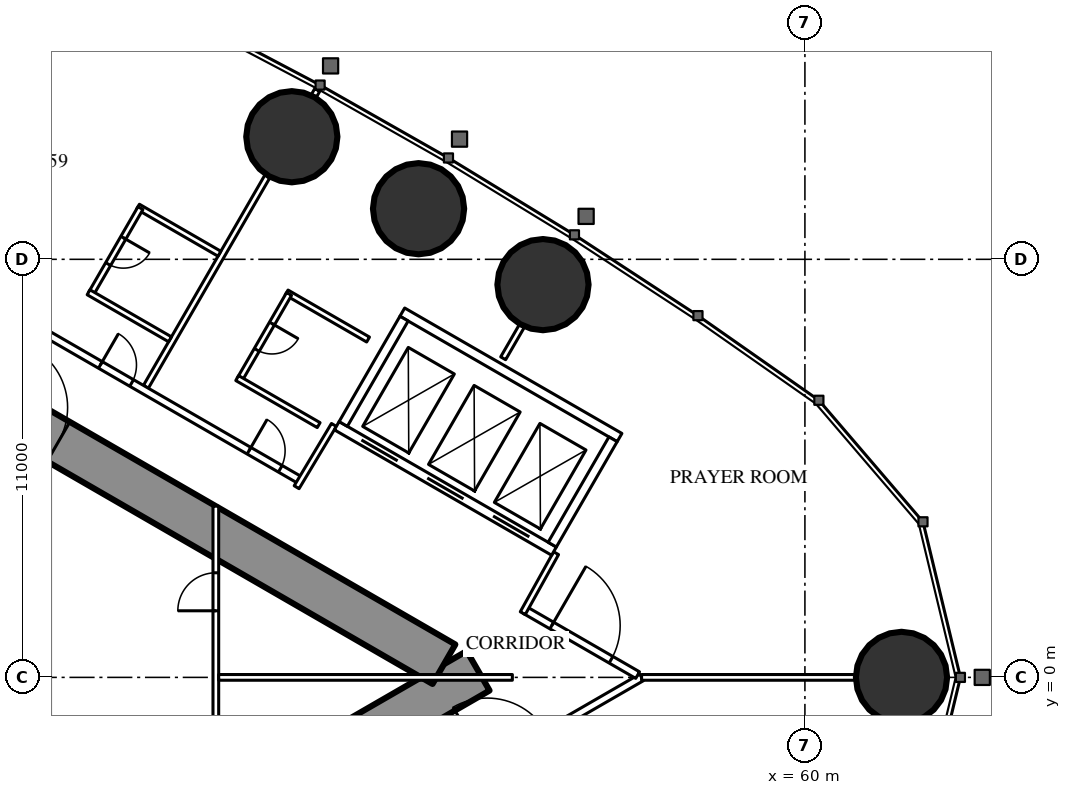
"""IFC4 building model, lengths in metres.
Left out: names, types, materials, properties, quantities, classifications, styles, units other than length and angle.
Written with IfcOpenShell. Run it as: python <this file> out.ifc"""

import sys

from ifc_helpers import new_model, si_unit, direction, frame, frame_2d, origin, origin_2d, place, context, subcontext, project, spatial, rectangle, circle, extrude, element, fill, save


model = new_model("IFC4")
c1 = context("Model", 3, precision=1e-05, world=origin(), true_north=direction((0.0, 1.0)))
c2 = subcontext(c1, "Body", "Model", "MODEL_VIEW")
j1 = project(units=[si_unit("LENGTHUNIT", "METRE"), si_unit("PLANEANGLEUNIT", "RADIAN")], contexts=[c1])
p1 = place(None, origin())
s1 = spatial("IfcSite", under=j1, at=p1, CompositionType="ELEMENT")
p2 = place(p1, origin())
s2 = spatial("IfcBuilding", under=s1, at=p2, CompositionType="ELEMENT")
p3 = place(p2, frame((0.0, 0.0, 244.1)))
s3 = spatial("IfcBuildingStorey", under=s2, at=p3, CompositionType="ELEMENT", Elevation=244.1)
for number, where, z_axis, x_axis in (
    (1, (62.542, 0.0, 0.0), (0.0, 0.0, 1.0), (1.0, 0.0, 0.0)),
    (2, (53.108, 10.334, 0.0), (0.0, 0.0, 1.0), (1.0, 0.0, 0.0)),
    (3, (49.834, 12.332, 0.0), (0.0, 0.0, 1.0), (1.0, 0.0, 0.0)),
    (4, (46.499, 14.226, 0.0), (0.0, 0.0, 1.0), (1.0, 0.0, 0.0)),
):
    element("IfcColumn", number, at=place(p3, frame(where, z_axis=z_axis, x_axis=x_axis)), inside=s3, PredefinedType="COLUMN", context=c2, shape_type="SweptSolid", body=[
        extrude(circle(Radius=1.2, at=origin_2d()), origin(), (0.0, 0.0, 1.0), 3.6),
    ])
p4 = place(p3, frame((27.2, -13.8, 0.0), z_axis=(0.0, 0.0, 1.0), x_axis=(0.866027159892, 0.499996958321, 0.0)))
e5 = element("IfcWall", 5, at=p4, inside=s3, PredefinedType="SHEAR", context=c2, shape_type="SweptSolid", body=[
    extrude(rectangle(XDim=27.947, YDim=1.2, at=frame_2d((13.973, 0.0))), origin(), (0.0, 0.0, 1.0), 3.6),
])
p5 = place(p4, frame((4.6, 0.0, 0.0)))
e6 = element("IfcOpeningElement", 6, at=p5, cuts=e5, PredefinedType="OPENING", context=c2, shape_type="SweptSolid", body=[
    extrude(rectangle(XDim=1.0, YDim=2.2, at=frame_2d((0.5, 1.1))), frame((0.0, 0.61, 0.0), z_axis=(0.0, -1.0, 0.0), x_axis=(1.0, 0.0, 0.0)), (0.0, 0.0, 1.0), 1.22),
])
p6 = place(p4, frame((13.395, 0.0, 0.0)))
e7 = element("IfcOpeningElement", 7, at=p6, cuts=e5, PredefinedType="OPENING", context=c2, shape_type="SweptSolid", body=[
    extrude(rectangle(XDim=1.8, YDim=2.2, at=frame_2d((0.9, 1.1))), frame((0.0, 0.61, 0.0), z_axis=(0.0, -1.0, 0.0), x_axis=(1.0, 0.0, 0.0)), (0.0, 0.0, 1.0), 1.22),
])
p7 = place(p3, frame((27.2, 13.8, 0.0), z_axis=(0.0, 0.0, 1.0), x_axis=(0.866024515034, -0.500001539357, 0.0)))
e8 = element("IfcWall", 8, at=p7, inside=s3, PredefinedType="SHEAR", context=c2, shape_type="SweptSolid", body=[
    extrude(rectangle(XDim=26.907, YDim=1.2, at=frame_2d((13.454, 0.0))), origin(), (0.0, 0.0, 1.0), 3.6),
])
p8 = place(p7, frame((4.6, 0.0, 0.0)))
e9 = element("IfcOpeningElement", 9, at=p8, cuts=e8, PredefinedType="OPENING", context=c2, shape_type="SweptSolid", body=[
    extrude(rectangle(XDim=1.0, YDim=2.2, at=frame_2d((0.5, 1.1))), frame((0.0, 0.61, 0.0), z_axis=(0.0, -1.0, 0.0), x_axis=(1.0, 0.0, 0.0)), (0.0, 0.0, 1.0), 1.22),
])
p9 = place(p7, frame((13.395, 0.0, 0.0)))
e10 = element("IfcOpeningElement", 10, at=p9, cuts=e8, PredefinedType="OPENING", context=c2, shape_type="SweptSolid", body=[
    extrude(rectangle(XDim=1.8, YDim=2.2, at=frame_2d((0.9, 1.1))), frame((0.0, 0.61, 0.0), z_axis=(0.0, -1.0, 0.0), x_axis=(1.0, 0.0, 0.0)), (0.0, 0.0, 1.0), 1.22),
])
p10 = place(p3, frame((28.959, -15.44, 0.0), z_axis=(0.0, 0.0, 1.0), x_axis=(0.866025227435, 0.500000305447, 0.0)))
e11 = element("IfcWall", 11, at=p10, inside=s3, PredefinedType="PARTITIONING", context=c2, shape_type="SweptSolid", body=[
    extrude(rectangle(XDim=30.88, YDim=0.2, at=frame_2d((15.44, 0.0))), origin(), (0.0, 0.0, 1.0), 3.35),
])
p11 = place(p10, frame((1.494, 0.0, 0.0)))
e12 = element("IfcOpeningElement", 12, at=p11, cuts=e11, PredefinedType="OPENING", context=c2, shape_type="SweptSolid", body=[
    extrude(rectangle(XDim=1.8, YDim=2.04, at=frame_2d((0.9, 1.02))), frame((0.0, 0.11, 0.0), z_axis=(0.0, -1.0, 0.0), x_axis=(1.0, 0.0, 0.0)), (0.0, 0.0, 1.0), 0.22),
])
p12 = place(p10, frame((7.687, 0.0, 0.0)))
e13 = element("IfcOpeningElement", 13, at=p12, cuts=e11, PredefinedType="OPENING", context=c2, shape_type="SweptSolid", body=[
    extrude(rectangle(XDim=1.0, YDim=2.2, at=frame_2d((0.5, 1.1))), frame((0.0, 0.11, 0.0), z_axis=(0.0, -1.0, 0.0), x_axis=(1.0, 0.0, 0.0)), (0.0, 0.0, 1.0), 0.22),
])
p13 = place(p10, frame((18.321, 0.0, 0.0)))
e14 = element("IfcOpeningElement", 14, at=p13, cuts=e11, PredefinedType="OPENING", context=c2, shape_type="SweptSolid", body=[
    extrude(rectangle(XDim=0.95, YDim=2.2, at=frame_2d((0.475, 1.1))), frame((0.0, 0.11, 0.0), z_axis=(0.0, -1.0, 0.0), x_axis=(1.0, 0.0, 0.0)), (0.0, 0.0, 1.0), 0.22),
])
p14 = place(p10, frame((22.203, 0.0, 0.0)))
e15 = element("IfcOpeningElement", 15, at=p14, cuts=e11, PredefinedType="OPENING", context=c2, shape_type="SweptSolid", body=[
    extrude(rectangle(XDim=0.95, YDim=2.2, at=frame_2d((0.475, 1.1))), frame((0.0, 0.11, 0.0), z_axis=(0.0, -1.0, 0.0), x_axis=(1.0, 0.0, 0.0)), (0.0, 0.0, 1.0), 0.22),
])
p15 = place(p10, frame((26.192, 0.0, 0.0)))
e16 = element("IfcOpeningElement", 16, at=p15, cuts=e11, PredefinedType="OPENING", context=c2, shape_type="SweptSolid", body=[
    extrude(rectangle(XDim=1.8, YDim=2.2, at=frame_2d((0.9, 1.1))), frame((0.0, 0.11, 0.0), z_axis=(0.0, -1.0, 0.0), x_axis=(1.0, 0.0, 0.0)), (0.0, 0.0, 1.0), 0.22),
])
p16 = place(p3, frame((42.66, 7.646, 0.0), z_axis=(0.0, 0.0, 1.0), x_axis=(0.499996592859, 0.866027370889, 0.0)))
e17 = element("IfcWall", 17, at=p16, inside=s3, PredefinedType="PARTITIONING", context=c2, shape_type="SweptSolid", body=[
    extrude(rectangle(XDim=6.398, YDim=0.15, at=frame_2d((3.199, 0.0))), origin(), (0.0, 0.0, 1.0), 2.45),
])
p17 = place(p3, frame((47.079, 15.3, 0.0), z_axis=(0.0, 0.0, 1.0), x_axis=(0.499212083968, 0.866479829667, 0.0)))
e18 = element("IfcWall", 18, at=p17, inside=s3, PredefinedType="PARTITIONING", context=c2, shape_type="SweptSolid", body=[
    extrude(rectangle(XDim=0.179, YDim=0.15, at=frame_2d((0.09, 0.0))), origin(), (0.0, 0.0, 1.0), 2.45),
])
p18 = place(p3, frame((55.702, 0.0, 0.0), z_axis=(0.0, 0.0, 1.0), x_axis=(1.0, 0.0, 0.0)))
e19 = element("IfcWall", 19, at=p18, inside=s3, PredefinedType="PARTITIONING", context=c2, shape_type="SweptSolid", body=[
    extrude(rectangle(XDim=5.619, YDim=0.15, at=frame_2d((2.81, 0.0))), origin(), (0.0, 0.0, 1.0), 2.45),
])
p19 = place(p3, frame((52.06, 8.396, 0.0), z_axis=(0.0, 0.0, 1.0), x_axis=(0.500095379624, 0.865970329329, 0.0)))
e20 = element("IfcWall", 20, at=p19, inside=s3, PredefinedType="PARTITIONING", context=c2, shape_type="SweptSolid", body=[
    extrude(rectangle(XDim=0.982, YDim=0.15, at=frame_2d((0.491, 0.0))), origin(), (0.0, 0.0, 1.0), 3.35),
])
p20 = place(p3, frame((28.959, 15.44, 0.0), z_axis=(0.0, 0.0, 1.0), x_axis=(0.866028936079, -0.499993881836, 0.0)))
e21 = element("IfcWall", 21, at=p20, inside=s3, PredefinedType="PARTITIONING", context=c2, shape_type="SweptSolid", body=[
    extrude(rectangle(XDim=20.503, YDim=0.2, at=frame_2d((10.251, 0.0))), origin(), (0.0, 0.0, 1.0), 3.35),
])
p21 = place(p20, frame((18.953, 0.0, 0.0)))
e22 = element("IfcOpeningElement", 22, at=p21, cuts=e21, PredefinedType="OPENING", context=c2, shape_type="SweptSolid", body=[
    extrude(rectangle(XDim=0.95, YDim=2.2, at=frame_2d((0.475, 1.1))), frame((0.0, 0.11, 0.0), z_axis=(0.0, -1.0, 0.0), x_axis=(1.0, 0.0, 0.0)), (0.0, 0.0, 1.0), 0.22),
])
p22 = place(p20, frame((14.437, 0.0, 0.0)))
e23 = element("IfcOpeningElement", 23, at=p22, cuts=e21, PredefinedType="OPENING", context=c2, shape_type="SweptSolid", body=[
    extrude(rectangle(XDim=0.95, YDim=2.2, at=frame_2d((0.475, 1.1))), frame((0.0, 0.11, 0.0), z_axis=(0.0, -1.0, 0.0), x_axis=(1.0, 0.0, 0.0)), (0.0, 0.0, 1.0), 0.22),
])
p23 = place(p20, frame((2.244, 0.0, 0.0)))
e24 = element("IfcOpeningElement", 24, at=p23, cuts=e21, PredefinedType="OPENING", context=c2, shape_type="SweptSolid", body=[
    extrude(rectangle(XDim=1.8, YDim=2.04, at=frame_2d((0.9, 1.02))), frame((0.0, 0.11, 0.0), z_axis=(0.0, -1.0, 0.0), x_axis=(1.0, 0.0, 0.0)), (0.0, 0.0, 1.0), 0.22),
])
p24 = place(p3, frame((52.639, 1.769, 0.0), z_axis=(0.0, 0.0, 1.0), x_axis=(0.866027340901, -0.4999966448, 0.0)))
e25 = element("IfcWall", 25, at=p24, inside=s3, PredefinedType="PARTITIONING", context=c2, shape_type="SweptSolid", body=[
    extrude(rectangle(XDim=3.417, YDim=0.2, at=frame_2d((1.708, 0.0))), origin(), (0.0, 0.0, 1.0), 3.35),
])
p25 = place(p24, frame((0.809, 0.0, 0.0)))
e26 = element("IfcOpeningElement", 26, at=p25, cuts=e25, PredefinedType="OPENING", context=c2, shape_type="SweptSolid", body=[
    extrude(rectangle(XDim=1.8, YDim=2.2, at=frame_2d((0.9, 1.1))), frame((0.0, 0.11, 0.0), z_axis=(0.0, -1.0, 0.0), x_axis=(1.0, 0.0, 0.0)), (0.0, 0.0, 1.0), 0.22),
])
p26 = place(p3, frame((47.606, 6.642, 0.0), z_axis=(0.0, 0.0, 1.0), x_axis=(-0.51353662755, -0.858067673418, 0.0)))
e27 = element("IfcWall", 27, at=p26, inside=s3, PredefinedType="PARTITIONING", context=c2, shape_type="SweptSolid", body=[
    extrude(rectangle(XDim=1.91, YDim=0.15, at=frame_2d((0.955, 0.0))), origin(), (0.0, 0.0, 1.0), 3.35),
])
p27 = place(p3, frame((52.576, 1.689, 0.0), z_axis=(0.0, 0.0, 1.0), x_axis=(0.485482130951, 0.874246590229, 0.0)))
e28 = element("IfcWall", 28, at=p27, inside=s3, PredefinedType="PARTITIONING", context=c2, shape_type="SweptSolid", body=[
    extrude(rectangle(XDim=1.805, YDim=0.15, at=frame_2d((0.902, 0.0))), origin(), (0.0, 0.0, 1.0), 3.35),
])
p28 = place(p3, frame((46.362, 10.127, 0.0), z_axis=(0.0, 0.0, 1.0), x_axis=(0.866006523861, -0.500032699561, 0.0)))
e29 = element("IfcWall", 29, at=p28, inside=s3, PredefinedType="PARTITIONING", context=c2, shape_type="SweptSolid", body=[
    extrude(rectangle(XDim=2.475, YDim=0.15, at=frame_2d((1.237, 0.0))), origin(), (0.0, 0.0, 1.0), 3.35),
])
p29 = place(p3, frame((45.127, 7.838, 0.0), z_axis=(0.0, 0.0, 1.0), x_axis=(0.500006934395, 0.866021400173, 0.0)))
e30 = element("IfcWall", 30, at=p29, inside=s3, PredefinedType="PARTITIONING", context=c2, shape_type="SweptSolid", body=[
    extrude(rectangle(XDim=2.6, YDim=0.15, at=frame_2d((1.3, 0.0))), origin(), (0.0, 0.0, 1.0), 3.35),
])
p30 = place(p29, frame((0.9, 0.0, 0.0)))
e31 = element("IfcOpeningElement", 31, at=p30, cuts=e30, PredefinedType="OPENING", context=c2, shape_type="SweptSolid", body=[
    extrude(rectangle(XDim=0.8, YDim=2.2, at=frame_2d((0.4, 1.1))), frame((0.0, 0.085, 0.0), z_axis=(0.0, -1.0, 0.0), x_axis=(1.0, 0.0, 0.0)), (0.0, 0.0, 1.0), 0.17),
])
p31 = place(p3, frame((45.062, 7.875, 0.0), z_axis=(0.0, 0.0, 1.0), x_axis=(0.866031185235, -0.4999899861, 0.0)))
e32 = element("IfcWall", 32, at=p31, inside=s3, PredefinedType="PARTITIONING", context=c2, shape_type="SweptSolid", body=[
    extrude(rectangle(XDim=2.475, YDim=0.15, at=frame_2d((1.238, 0.0))), origin(), (0.0, 0.0, 1.0), 2.5),
])
p32 = place(p3, frame((42.451, 12.385, 0.0), z_axis=(0.0, 0.0, 1.0), x_axis=(0.866031185235, -0.4999899861, 0.0)))
e33 = element("IfcWall", 33, at=p32, inside=s3, PredefinedType="PARTITIONING", context=c2, shape_type="SweptSolid", body=[
    extrude(rectangle(XDim=2.475, YDim=0.15, at=frame_2d((1.238, 0.0))), origin(), (0.0, 0.0, 1.0), 3.35),
])
p33 = place(p3, frame((41.216, 10.095, 0.0), z_axis=(0.0, 0.0, 1.0), x_axis=(0.499936506574, 0.866062058628, 0.0)))
e34 = element("IfcWall", 34, at=p33, inside=s3, PredefinedType="PARTITIONING", context=c2, shape_type="SweptSolid", body=[
    extrude(rectangle(XDim=2.6, YDim=0.15, at=frame_2d((1.3, 0.0))), origin(), (0.0, 0.0, 1.0), 3.35),
])
p34 = place(p33, frame((0.9, 0.0, 0.0)))
e35 = element("IfcOpeningElement", 35, at=p34, cuts=e34, PredefinedType="OPENING", context=c2, shape_type="SweptSolid", body=[
    extrude(rectangle(XDim=0.8, YDim=2.2, at=frame_2d((0.4, 1.1))), frame((0.0, 0.085, 0.0), z_axis=(0.0, -1.0, 0.0), x_axis=(1.0, 0.0, 0.0)), (0.0, 0.0, 1.0), 0.17),
])
p35 = place(p3, frame((41.151, 10.133, 0.0), z_axis=(0.0, 0.0, 1.0), x_axis=(0.866006523861, -0.500032699561, 0.0)))
e36 = element("IfcWall", 36, at=p35, inside=s3, PredefinedType="PARTITIONING", context=c2, shape_type="SweptSolid", body=[
    extrude(rectangle(XDim=2.475, YDim=0.15, at=frame_2d((1.237, 0.0))), origin(), (0.0, 0.0, 1.0), 2.5),
])
p36 = place(p3, frame((44.5, -4.505, 0.0), z_axis=(0.0, 0.0, 1.0), x_axis=(0.0, 1.0, 0.0)))
e37 = element("IfcWall", 37, at=p36, inside=s3, PredefinedType="PARTITIONING", context=c2, shape_type="SweptSolid", body=[
    extrude(rectangle(XDim=9.009, YDim=0.15, at=frame_2d((4.505, 0.0))), origin(), (0.0, 0.0, 1.0), 3.35),
])
p37 = place(p36, frame((1.752, 0.0, 0.0)))
e38 = element("IfcOpeningElement", 38, at=p37, cuts=e37, PredefinedType="OPENING", context=c2, shape_type="SweptSolid", body=[
    extrude(rectangle(XDim=1.0, YDim=2.2, at=frame_2d((0.5, 1.1))), frame((0.0, 0.085, 0.0), z_axis=(0.0, -1.0, 0.0), x_axis=(1.0, 0.0, 0.0)), (0.0, 0.0, 1.0), 0.17),
])
p38 = place(p36, frame((6.257, 0.0, 0.0)))
e39 = element("IfcOpeningElement", 39, at=p38, cuts=e37, PredefinedType="OPENING", context=c2, shape_type="SweptSolid", body=[
    extrude(rectangle(XDim=1.0, YDim=2.2, at=frame_2d((0.5, 1.1))), frame((0.0, 0.085, 0.0), z_axis=(0.0, -1.0, 0.0), x_axis=(1.0, 0.0, 0.0)), (0.0, 0.0, 1.0), 0.17),
])
p39 = place(p3, frame((44.575, 0.0, 0.0), z_axis=(0.0, 0.0, 1.0), x_axis=(1.0, 0.0, 0.0)))
e40 = element("IfcWall", 40, at=p39, inside=s3, PredefinedType="PARTITIONING", context=c2, shape_type="SweptSolid", body=[
    extrude(rectangle(XDim=7.727, YDim=0.15, at=frame_2d((3.864, 0.0))), origin(), (0.0, 0.0, 1.0), 2.45),
])
p40 = place(p3, frame((47.681, 6.622, 0.0), z_axis=(0.0, 0.0, 1.0), x_axis=(0.86603344179, -0.499986077507, 0.0)))
e41 = element("IfcWall", 41, at=p40, inside=s3, PredefinedType="PARTITIONING", context=c2, shape_type="SweptSolid", body=[
    extrude(rectangle(XDim=6.6, YDim=0.25, at=frame_2d((3.3, 0.0))), origin(), (0.0, 0.0, 1.0), 3.35),
])
p41 = place(p40, frame((0.75, 0.0, 0.0)))
e42 = element("IfcOpeningElement", 42, at=p41, cuts=e41, PredefinedType="OPENING", context=c2, shape_type="SweptSolid", body=[
    extrude(rectangle(XDim=1.1, YDim=2.2, at=frame_2d((0.55, 1.1))), frame((0.0, 0.135, 0.0), z_axis=(0.0, -1.0, 0.0), x_axis=(1.0, 0.0, 0.0)), (0.0, 0.0, 1.0), 0.27),
])
p42 = place(p40, frame((2.75, 0.0, 0.0)))
e43 = element("IfcOpeningElement", 43, at=p42, cuts=e41, PredefinedType="OPENING", context=c2, shape_type="SweptSolid", body=[
    extrude(rectangle(XDim=1.1, YDim=2.2, at=frame_2d((0.55, 1.1))), frame((0.0, 0.135, 0.0), z_axis=(0.0, -1.0, 0.0), x_axis=(1.0, 0.0, 0.0)), (0.0, 0.0, 1.0), 0.27),
])
p43 = place(p40, frame((4.75, 0.0, 0.0)))
e44 = element("IfcOpeningElement", 44, at=p43, cuts=e41, PredefinedType="OPENING", context=c2, shape_type="SweptSolid", body=[
    extrude(rectangle(XDim=1.1, YDim=2.2, at=frame_2d((0.55, 1.1))), frame((0.0, 0.135, 0.0), z_axis=(0.0, -1.0, 0.0), x_axis=(1.0, 0.0, 0.0)), (0.0, 0.0, 1.0), 0.27),
])
p44 = place(p3, frame((49.406, 9.611, 0.0), z_axis=(0.0, 0.0, 1.0), x_axis=(0.86603344179, -0.499986077507, 0.0)))
e45 = element("IfcWall", 45, at=p44, inside=s3, PredefinedType="PARTITIONING", context=c2, shape_type="SweptSolid", body=[
    extrude(rectangle(XDim=6.6, YDim=0.25, at=frame_2d((3.3, 0.0))), origin(), (0.0, 0.0, 1.0), 3.35),
])
p45 = place(p3, frame((47.852, 6.668, 0.0), z_axis=(0.0, 0.0, 1.0), x_axis=(0.499929347863, 0.866066190972, 0.0)))
e46 = element("IfcWall", 46, at=p45, inside=s3, PredefinedType="PARTITIONING", context=c2, shape_type="SweptSolid", body=[
    extrude(rectangle(XDim=3.201, YDim=0.25, at=frame_2d((1.6, 0.0))), origin(), (0.0, 0.0, 1.0), 3.35),
])
p46 = place(p3, frame((53.352, 3.493, 0.0), z_axis=(0.0, 0.0, 1.0), x_axis=(0.499872130319, 0.866099216793, 0.0)))
e47 = element("IfcWall", 47, at=p46, inside=s3, PredefinedType="PARTITIONING", context=c2, shape_type="SweptSolid", body=[
    extrude(rectangle(XDim=3.2, YDim=0.25, at=frame_2d((1.6, 0.0))), origin(), (0.0, 0.0, 1.0), 3.35),
])
p47 = place(p30, origin())
e48 = element("IfcDoor", 48, at=p47, inside=s3, OperationType="SINGLE_SWING_RIGHT", PredefinedType="DOOR", context=c2, shape_type="SweptSolid", body=[
    extrude(rectangle(XDim=0.8, YDim=2.2, at=frame_2d((0.4, 1.1))), frame((0.0, 0.025, 0.0), z_axis=(0.0, -1.0, 0.0), x_axis=(1.0, 0.0, 0.0)), (0.0, 0.0, 1.0), 0.05),
])
fill(e31, e48)
p48 = place(p21, origin())
e49 = element("IfcDoor", 49, at=p48, inside=s3, OperationType="SINGLE_SWING_LEFT", PredefinedType="DOOR", context=c2, shape_type="SweptSolid", body=[
    extrude(rectangle(XDim=0.95, YDim=2.2, at=frame_2d((0.475, 1.1))), frame((0.0, 0.025, 0.0), z_axis=(0.0, -1.0, 0.0), x_axis=(1.0, 0.0, 0.0)), (0.0, 0.0, 1.0), 0.05),
])
fill(e22, e49)
p49 = place(p34, origin())
e50 = element("IfcDoor", 50, at=p49, inside=s3, OperationType="SINGLE_SWING_RIGHT", PredefinedType="DOOR", context=c2, shape_type="SweptSolid", body=[
    extrude(rectangle(XDim=0.8, YDim=2.2, at=frame_2d((0.4, 1.1))), frame((0.0, 0.025, 0.0), z_axis=(0.0, -1.0, 0.0), x_axis=(1.0, 0.0, 0.0)), (0.0, 0.0, 1.0), 0.05),
])
fill(e35, e50)
p50 = place(p22, origin())
e51 = element("IfcDoor", 51, at=p50, inside=s3, OperationType="SINGLE_SWING_LEFT", PredefinedType="DOOR", context=c2, shape_type="SweptSolid", body=[
    extrude(rectangle(XDim=0.95, YDim=2.2, at=frame_2d((0.475, 1.1))), frame((0.0, 0.025, 0.0), z_axis=(0.0, -1.0, 0.0), x_axis=(1.0, 0.0, 0.0)), (0.0, 0.0, 1.0), 0.05),
])
fill(e23, e51)
p51 = place(p25, origin())
e52 = element("IfcDoor", 52, at=p51, inside=s3, OperationType="DOUBLE_DOOR_SINGLE_SWING", PredefinedType="DOOR", context=c2, shape_type="SweptSolid", body=[
    extrude(rectangle(XDim=1.8, YDim=2.2, at=frame_2d((0.9, 1.1))), frame((0.0, 0.025, 0.0), z_axis=(0.0, -1.0, 0.0), x_axis=(1.0, 0.0, 0.0)), (0.0, 0.0, 1.0), 0.05),
])
fill(e26, e52)
p52 = place(p38, origin())
e53 = element("IfcDoor", 53, at=p52, inside=s3, OperationType="SINGLE_SWING_LEFT", PredefinedType="DOOR", context=c2, shape_type="SweptSolid", body=[
    extrude(rectangle(XDim=1.0, YDim=2.2, at=frame_2d((0.5, 1.1))), frame((0.0, 0.025, 0.0), z_axis=(0.0, -1.0, 0.0), x_axis=(1.0, 0.0, 0.0)), (0.0, 0.0, 1.0), 0.05),
])
fill(e39, e53)
p53 = place(p9, origin())
e54 = element("IfcDoor", 54, at=p53, inside=s3, OperationType="DOUBLE_DOOR_SINGLE_SWING", PredefinedType="DOOR", context=c2, shape_type="SweptSolid", body=[
    extrude(rectangle(XDim=1.8, YDim=2.2, at=frame_2d((0.9, 1.1))), frame((0.0, 0.025, 0.0), z_axis=(0.0, -1.0, 0.0), x_axis=(1.0, 0.0, 0.0)), (0.0, 0.0, 1.0), 0.05),
])
fill(e10, e54)
p54 = place(p41, origin())
e55 = element("IfcDoor", 55, at=p54, inside=s3, OperationType="DOUBLE_DOOR_SLIDING", PredefinedType="USERDEFINED", context=c2, shape_type="SweptSolid", body=[
    extrude(rectangle(XDim=1.1, YDim=2.2, at=frame_2d((0.55, 1.1))), frame((0.0, 0.025, 0.0), z_axis=(0.0, -1.0, 0.0), x_axis=(1.0, 0.0, 0.0)), (0.0, 0.0, 1.0), 0.05),
])
fill(e42, e55)
p55 = place(p42, origin())
e56 = element("IfcDoor", 56, at=p55, inside=s3, OperationType="DOUBLE_DOOR_SLIDING", PredefinedType="USERDEFINED", context=c2, shape_type="SweptSolid", body=[
    extrude(rectangle(XDim=1.1, YDim=2.2, at=frame_2d((0.55, 1.1))), frame((0.0, 0.025, 0.0), z_axis=(0.0, -1.0, 0.0), x_axis=(1.0, 0.0, 0.0)), (0.0, 0.0, 1.0), 0.05),
])
fill(e43, e56)
p56 = place(p43, origin())
e57 = element("IfcDoor", 57, at=p56, inside=s3, OperationType="DOUBLE_DOOR_SLIDING", PredefinedType="USERDEFINED", context=c2, shape_type="SweptSolid", body=[
    extrude(rectangle(XDim=1.1, YDim=2.2, at=frame_2d((0.55, 1.1))), frame((0.0, 0.025, 0.0), z_axis=(0.0, -1.0, 0.0), x_axis=(1.0, 0.0, 0.0)), (0.0, 0.0, 1.0), 0.05),
])
fill(e44, e57)
save(model, sys.argv[1])
